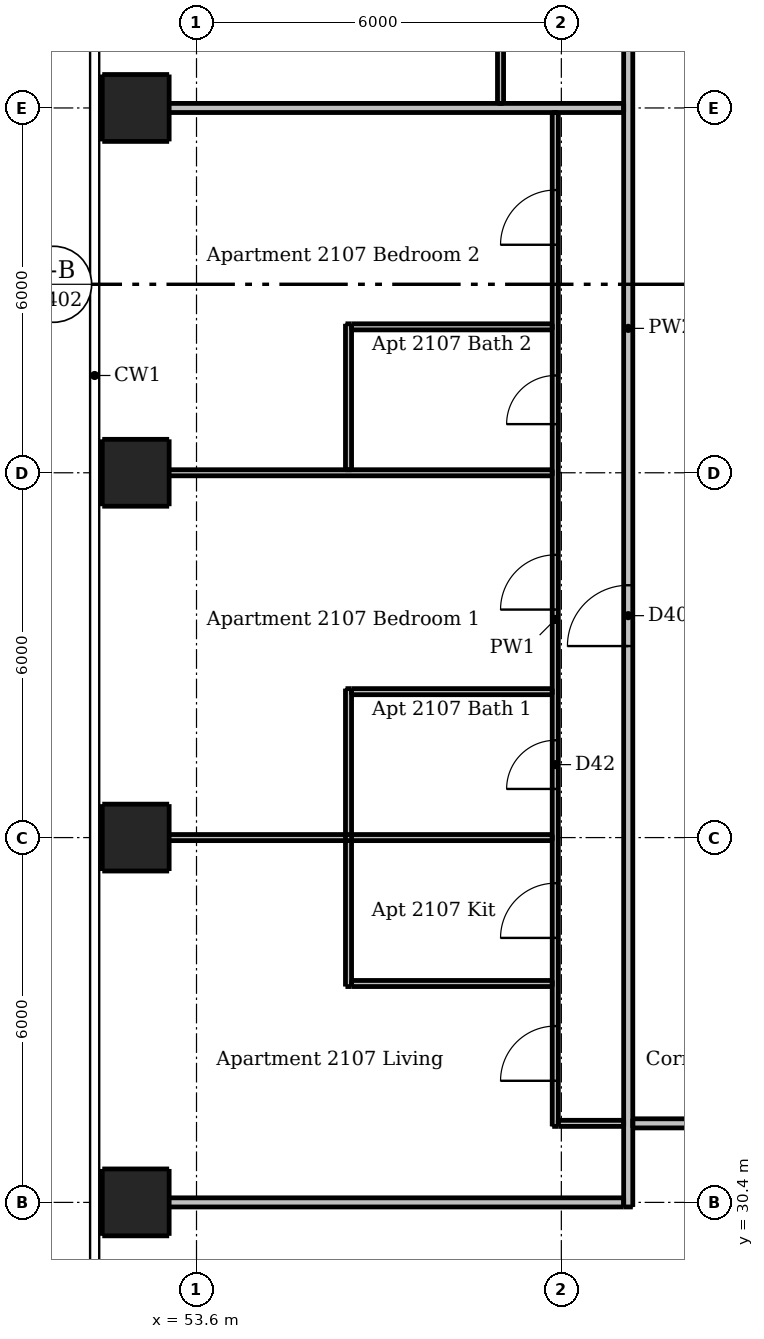
"""IFC4 building model, lengths in metres.
Left out: names, types, materials, properties, quantities, classifications, styles, units other than length and angle.
Written with IfcOpenShell. Run it as: python <this file> out.ifc"""

import sys

from ifc_helpers import new_model, si_unit, direction, frame, frame_2d, origin, origin_2d, place, context, subcontext, project, spatial, rectangle, extrude, element, fill, save


model = new_model("IFC4")
c1 = context("Model", 3, precision=1e-05, world=origin(), true_north=direction((0.0, 1.0)))
c2 = subcontext(c1, "Body", "Model", "MODEL_VIEW")
j1 = project(units=[si_unit("LENGTHUNIT", "METRE"), si_unit("PLANEANGLEUNIT", "RADIAN")], contexts=[c1])
p1 = place(None, origin())
s1 = spatial("IfcSite", under=j1, at=p1, CompositionType="ELEMENT")
p2 = place(p1, origin())
s2 = spatial("IfcBuilding", under=s1, at=p2, CompositionType="ELEMENT")
p3 = place(p2, frame((0.0, 0.0, 82.0)))
s3 = spatial("IfcBuildingStorey", under=s2, at=p3, CompositionType="ELEMENT", Elevation=82.0)
for number, where, z_axis, x_axis in (
    (1, (52.6, 30.4, 0.0), (0.0, 0.0, 1.0), (1.0, 0.0, 0.0)),
    (2, (52.6, 36.4, 0.0), (0.0, 0.0, 1.0), (1.0, 0.0, 0.0)),
    (3, (52.6, 42.4, 0.0), (0.0, 0.0, 1.0), (1.0, 0.0, 0.0)),
    (4, (52.6, 48.4, 0.0), (0.0, 0.0, 1.0), (1.0, 0.0, 0.0)),
):
    element("IfcColumn", number, at=place(p3, frame(where, z_axis=z_axis, x_axis=x_axis)), inside=s3, PredefinedType="COLUMN", context=c2, shape_type="SweptSolid", body=[
        extrude(rectangle(XDim=1.1, YDim=1.1, at=origin_2d()), origin(), (0.0, 0.0, 1.0), 3.05),
    ])
p4 = place(p3, frame((56.1, 33.95, 0.0), z_axis=(0.0, 0.0, 1.0), x_axis=(0.0, 1.0, 0.0)))
e5 = element("IfcWall", 5, at=p4, inside=s3, PredefinedType="PARTITIONING", context=c2, shape_type="SweptSolid", body=[
    extrude(rectangle(XDim=4.9, YDim=0.1, at=frame_2d((2.45, 0.0))), origin(), (0.0, 0.0, 1.0), 3.05),
])
p5 = place(p3, frame((56.1, 42.45, 0.0), z_axis=(0.0, 0.0, 1.0), x_axis=(0.0, 1.0, 0.0)))
e6 = element("IfcWall", 6, at=p5, inside=s3, PredefinedType="PARTITIONING", context=c2, shape_type="SweptSolid", body=[
    extrude(rectangle(XDim=2.4, YDim=0.1, at=frame_2d((1.2, 0.0))), origin(), (0.0, 0.0, 1.0), 3.05),
])
p6 = place(p3, frame((58.6, 54.35, 0.0), z_axis=(0.0, 0.0, 1.0), x_axis=(0.0, -1.0, 0.0)))
e7 = element("IfcWall", 7, at=p6, inside=s3, PredefinedType="PARTITIONING", context=c2, shape_type="SweptSolid", body=[
    extrude(rectangle(XDim=5.875, YDim=0.1, at=frame_2d((2.938, 0.0))), origin(), (0.0, 0.0, 1.0), 3.05),
])
p7 = place(p6, frame((3.75, 0.0, 0.0)))
e8 = element("IfcOpeningElement", 8, at=p7, cuts=e7, PredefinedType="OPENING", context=c2, shape_type="SweptSolid", body=[
    extrude(rectangle(XDim=0.8, YDim=2.1, at=frame_2d((0.4, 1.05))), frame((0.0, 0.06, 0.0), z_axis=(0.0, -1.0, 0.0), x_axis=(1.0, 0.0, 0.0)), (0.0, 0.0, 1.0), 0.12),
])
p8 = place(p3, frame((59.5, 31.65, 0.0), z_axis=(0.0, 0.0, 1.0), x_axis=(0.0, 1.0, 0.0)))
e9 = element("IfcWall", 9, at=p8, inside=s3, PredefinedType="PARTITIONING", context=c2, shape_type="SweptSolid", body=[
    extrude(rectangle(XDim=16.675, YDim=0.1, at=frame_2d((8.337, 0.0))), origin(), (0.0, 0.0, 1.0), 2.51),
])
p9 = place(p8, frame((0.75, 0.0, 0.0)))
e10 = element("IfcOpeningElement", 10, at=p9, cuts=e9, PredefinedType="OPENING", context=c2, shape_type="SweptSolid", body=[
    extrude(rectangle(XDim=0.9, YDim=2.1, at=frame_2d((0.45, 1.05))), frame((0.0, 0.06, 0.0), z_axis=(0.0, -1.0, 0.0), x_axis=(1.0, 0.0, 0.0)), (0.0, 0.0, 1.0), 0.12),
])
p10 = place(p8, frame((3.1, 0.0, 0.0)))
e11 = element("IfcOpeningElement", 11, at=p10, cuts=e9, PredefinedType="OPENING", context=c2, shape_type="SweptSolid", body=[
    extrude(rectangle(XDim=0.9, YDim=2.1, at=frame_2d((0.45, 1.05))), frame((0.0, 0.06, 0.0), z_axis=(0.0, -1.0, 0.0), x_axis=(1.0, 0.0, 0.0)), (0.0, 0.0, 1.0), 0.12),
])
p11 = place(p8, frame((8.5, 0.0, 0.0)))
e12 = element("IfcOpeningElement", 12, at=p11, cuts=e9, PredefinedType="OPENING", context=c2, shape_type="SweptSolid", body=[
    extrude(rectangle(XDim=0.9, YDim=2.1, at=frame_2d((0.45, 1.05))), frame((0.0, 0.06, 0.0), z_axis=(0.0, -1.0, 0.0), x_axis=(1.0, 0.0, 0.0)), (0.0, 0.0, 1.0), 0.12),
])
p12 = place(p8, frame((14.5, 0.0, 0.0)))
e13 = element("IfcOpeningElement", 13, at=p12, cuts=e9, PredefinedType="OPENING", context=c2, shape_type="SweptSolid", body=[
    extrude(rectangle(XDim=0.9, YDim=2.1, at=frame_2d((0.45, 1.05))), frame((0.0, 0.06, 0.0), z_axis=(0.0, -1.0, 0.0), x_axis=(1.0, 0.0, 0.0)), (0.0, 0.0, 1.0), 0.12),
])
p13 = place(p8, frame((5.55, 0.0, 0.0)))
e14 = element("IfcOpeningElement", 14, at=p13, cuts=e9, PredefinedType="OPENING", context=c2, shape_type="SweptSolid", body=[
    extrude(rectangle(XDim=0.8, YDim=2.1, at=frame_2d((0.4, 1.05))), frame((0.0, 0.06, 0.0), z_axis=(0.0, -1.0, 0.0), x_axis=(1.0, 0.0, 0.0)), (0.0, 0.0, 1.0), 0.12),
])
p14 = place(p8, frame((11.55, 0.0, 0.0)))
e15 = element("IfcOpeningElement", 15, at=p14, cuts=e9, PredefinedType="OPENING", context=c2, shape_type="SweptSolid", body=[
    extrude(rectangle(XDim=0.8, YDim=2.1, at=frame_2d((0.4, 1.05))), frame((0.0, 0.06, 0.0), z_axis=(0.0, -1.0, 0.0), x_axis=(1.0, 0.0, 0.0)), (0.0, 0.0, 1.0), 0.12),
])
p15 = place(p3, frame((56.15, 44.8, 0.0), z_axis=(0.0, 0.0, 1.0), x_axis=(1.0, 0.0, 0.0)))
e16 = element("IfcWall", 16, at=p15, inside=s3, PredefinedType="PARTITIONING", context=c2, shape_type="SweptSolid", body=[
    extrude(rectangle(XDim=3.3, YDim=0.1, at=frame_2d((1.65, 0.0))), origin(), (0.0, 0.0, 1.0), 3.05),
])
p16 = place(p3, frame((52.0, 42.4, 0.0), z_axis=(0.0, 0.0, 1.0), x_axis=(1.0, 0.0, 0.0)))
e17 = element("IfcWall", 17, at=p16, inside=s3, PredefinedType="PARTITIONING", context=c2, shape_type="SweptSolid", body=[
    extrude(rectangle(XDim=7.45, YDim=0.1, at=frame_2d((3.725, 0.0))), origin(), (0.0, 0.0, 1.0), 2.516),
])
p17 = place(p3, frame((56.15, 38.8, 0.0), z_axis=(0.0, 0.0, 1.0), x_axis=(1.0, 0.0, 0.0)))
e18 = element("IfcWall", 18, at=p17, inside=s3, PredefinedType="PARTITIONING", context=c2, shape_type="SweptSolid", body=[
    extrude(rectangle(XDim=3.3, YDim=0.1, at=frame_2d((1.65, 0.0))), origin(), (0.0, 0.0, 1.0), 3.05),
])
p18 = place(p3, frame((52.0, 36.4, 0.0), z_axis=(0.0, 0.0, 1.0), x_axis=(1.0, 0.0, 0.0)))
e19 = element("IfcWall", 19, at=p18, inside=s3, PredefinedType="PARTITIONING", context=c2, shape_type="SweptSolid", body=[
    extrude(rectangle(XDim=7.45, YDim=0.1, at=frame_2d((3.725, 0.0))), origin(), (0.0, 0.0, 1.0), 2.516),
])
p19 = place(p3, frame((56.15, 34.0, 0.0), z_axis=(0.0, 0.0, 1.0), x_axis=(1.0, 0.0, 0.0)))
e20 = element("IfcWall", 20, at=p19, inside=s3, PredefinedType="PARTITIONING", context=c2, shape_type="SweptSolid", body=[
    extrude(rectangle(XDim=3.3, YDim=0.1, at=frame_2d((1.65, 0.0))), origin(), (0.0, 0.0, 1.0), 3.05),
])
p20 = place(p3, frame((59.55, 31.7, 0.0), z_axis=(0.0, 0.0, 1.0), x_axis=(1.0, 0.0, 0.0)))
e21 = element("IfcWall", 21, at=p20, inside=s3, PredefinedType="PARTITIONING", context=c2, shape_type="SweptSolid", body=[
    extrude(rectangle(XDim=1.075, YDim=0.1, at=frame_2d((0.538, 0.0))), origin(), (0.0, 0.0, 1.0), 3.05),
])
p21 = place(p3, frame((60.7, 30.325, 0.0), z_axis=(0.0, 0.0, 1.0), x_axis=(0.0, 1.0, 0.0)))
e22 = element("IfcWall", 22, at=p21, inside=s3, PredefinedType="PARTITIONING", context=c2, shape_type="SweptSolid", body=[
    extrude(rectangle(XDim=28.9, YDim=0.15, at=frame_2d((14.45, 0.0))), origin(), (0.0, 0.0, 1.0), 3.05),
])
p22 = place(p21, frame((9.225, 0.0, 0.0)))
e23 = element("IfcOpeningElement", 23, at=p22, cuts=e22, PredefinedType="OPENING", context=c2, shape_type="SweptSolid", body=[
    extrude(rectangle(XDim=1.0, YDim=2.1, at=frame_2d((0.5, 1.05))), frame((0.0, 0.085, 0.0), z_axis=(0.0, -1.0, 0.0), x_axis=(1.0, 0.0, 0.0)), (0.0, 0.0, 1.0), 0.17),
])
p23 = place(p21, frame((26.025, 0.0, 0.0)))
e24 = element("IfcOpeningElement", 24, at=p23, cuts=e22, PredefinedType="OPENING", context=c2, shape_type="SweptSolid", body=[
    extrude(rectangle(XDim=1.0, YDim=2.1, at=frame_2d((0.5, 1.05))), frame((0.0, 0.085, 0.0), z_axis=(0.0, -1.0, 0.0), x_axis=(1.0, 0.0, 0.0)), (0.0, 0.0, 1.0), 0.17),
])
p24 = place(p3, frame((52.0, 48.4, 0.0), z_axis=(0.0, 0.0, 1.0), x_axis=(1.0, 0.0, 0.0)))
e25 = element("IfcWall", 25, at=p24, inside=s3, PredefinedType="PARTITIONING", context=c2, shape_type="SweptSolid", body=[
    extrude(rectangle(XDim=8.625, YDim=0.15, at=frame_2d((4.312, 0.0))), origin(), (0.0, 0.0, 1.0), 2.516),
])
p25 = place(p3, frame((89.525, 31.7, 0.0), z_axis=(0.0, 0.0, 1.0), x_axis=(-1.0, 0.0, 0.0)))
e26 = element("IfcWall", 26, at=p25, inside=s3, PredefinedType="PARTITIONING", context=c2, shape_type="SweptSolid", body=[
    extrude(rectangle(XDim=28.75, YDim=0.15, at=frame_2d((14.375, 0.0))), origin(), (0.0, 0.0, 1.0), 3.05),
])
p26 = place(p25, frame((24.625, 0.0, 0.0)))
e27 = element("IfcOpeningElement", 27, at=p26, cuts=e26, PredefinedType="OPENING", context=c2, shape_type="SweptSolid", body=[
    extrude(rectangle(XDim=1.0, YDim=2.1, at=frame_2d((0.5, 1.05))), frame((0.0, 0.085, 0.0), z_axis=(0.0, -1.0, 0.0), x_axis=(1.0, 0.0, 0.0)), (0.0, 0.0, 1.0), 0.17),
])
p27 = place(p25, frame((7.525, 0.0, 0.0)))
e28 = element("IfcOpeningElement", 28, at=p27, cuts=e26, PredefinedType="OPENING", context=c2, shape_type="SweptSolid", body=[
    extrude(rectangle(XDim=1.0, YDim=2.1, at=frame_2d((0.5, 1.05))), frame((0.0, 0.085, 0.0), z_axis=(0.0, -1.0, 0.0), x_axis=(1.0, 0.0, 0.0)), (0.0, 0.0, 1.0), 0.17),
])
p28 = place(p3, frame((52.0, 30.4, 0.0), z_axis=(0.0, 0.0, 1.0), x_axis=(1.0, 0.0, 0.0)))
e29 = element("IfcWall", 29, at=p28, inside=s3, PredefinedType="PARTITIONING", context=c2, shape_type="SweptSolid", body=[
    extrude(rectangle(XDim=8.625, YDim=0.15, at=frame_2d((4.312, 0.0))), origin(), (0.0, 0.0, 1.0), 2.647),
])
p29 = place(p22, origin())
e30 = element("IfcDoor", 30, at=p29, inside=s3, OperationType="SINGLE_SWING_LEFT", PredefinedType="DOOR", context=c2, shape_type="SweptSolid", body=[
    extrude(rectangle(XDim=1.0, YDim=2.1, at=frame_2d((0.5, 1.05))), frame((0.0, 0.025, 0.0), z_axis=(0.0, -1.0, 0.0), x_axis=(1.0, 0.0, 0.0)), (0.0, 0.0, 1.0), 0.05),
])
fill(e23, e30)
p30 = place(p9, origin())
e31 = element("IfcDoor", 31, at=p30, inside=s3, OperationType="SINGLE_SWING_LEFT", PredefinedType="DOOR", context=c2, shape_type="SweptSolid", body=[
    extrude(rectangle(XDim=0.9, YDim=2.1, at=frame_2d((0.45, 1.05))), frame((0.0, 0.025, 0.0), z_axis=(0.0, -1.0, 0.0), x_axis=(1.0, 0.0, 0.0)), (0.0, 0.0, 1.0), 0.05),
])
fill(e10, e31)
p31 = place(p10, origin())
e32 = element("IfcDoor", 32, at=p31, inside=s3, OperationType="SINGLE_SWING_LEFT", PredefinedType="DOOR", context=c2, shape_type="SweptSolid", body=[
    extrude(rectangle(XDim=0.9, YDim=2.1, at=frame_2d((0.45, 1.05))), frame((0.0, 0.025, 0.0), z_axis=(0.0, -1.0, 0.0), x_axis=(1.0, 0.0, 0.0)), (0.0, 0.0, 1.0), 0.05),
])
fill(e11, e32)
p32 = place(p11, origin())
e33 = element("IfcDoor", 33, at=p32, inside=s3, OperationType="SINGLE_SWING_LEFT", PredefinedType="DOOR", context=c2, shape_type="SweptSolid", body=[
    extrude(rectangle(XDim=0.9, YDim=2.1, at=frame_2d((0.45, 1.05))), frame((0.0, 0.025, 0.0), z_axis=(0.0, -1.0, 0.0), x_axis=(1.0, 0.0, 0.0)), (0.0, 0.0, 1.0), 0.05),
])
fill(e12, e33)
p33 = place(p12, origin())
e34 = element("IfcDoor", 34, at=p33, inside=s3, OperationType="SINGLE_SWING_LEFT", PredefinedType="DOOR", context=c2, shape_type="SweptSolid", body=[
    extrude(rectangle(XDim=0.9, YDim=2.1, at=frame_2d((0.45, 1.05))), frame((0.0, 0.025, 0.0), z_axis=(0.0, -1.0, 0.0), x_axis=(1.0, 0.0, 0.0)), (0.0, 0.0, 1.0), 0.05),
])
fill(e13, e34)
p34 = place(p13, origin())
e35 = element("IfcDoor", 35, at=p34, inside=s3, OperationType="SINGLE_SWING_LEFT", PredefinedType="DOOR", context=c2, shape_type="SweptSolid", body=[
    extrude(rectangle(XDim=0.8, YDim=2.1, at=frame_2d((0.4, 1.05))), frame((0.0, 0.025, 0.0), z_axis=(0.0, -1.0, 0.0), x_axis=(1.0, 0.0, 0.0)), (0.0, 0.0, 1.0), 0.05),
])
fill(e14, e35)
p35 = place(p14, origin())
e36 = element("IfcDoor", 36, at=p35, inside=s3, OperationType="SINGLE_SWING_LEFT", PredefinedType="DOOR", context=c2, shape_type="SweptSolid", body=[
    extrude(rectangle(XDim=0.8, YDim=2.1, at=frame_2d((0.4, 1.05))), frame((0.0, 0.025, 0.0), z_axis=(0.0, -1.0, 0.0), x_axis=(1.0, 0.0, 0.0)), (0.0, 0.0, 1.0), 0.05),
])
fill(e15, e36)
save(model, sys.argv[1])
